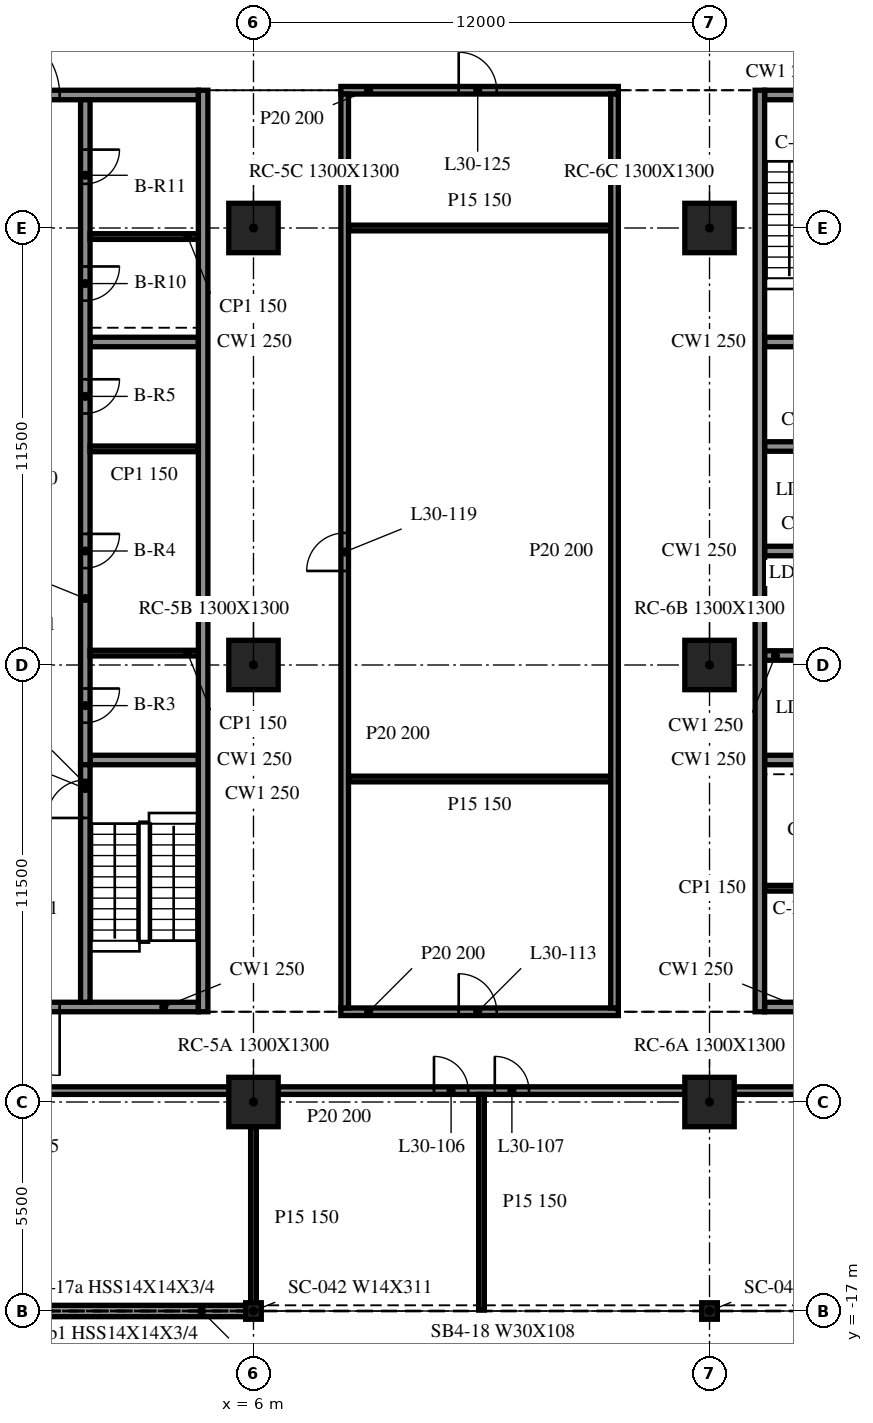
"""IFC4 building model, lengths in metres.
Left out: names, types, materials, properties, quantities, classifications, styles, units other than length and angle.
Written with IfcOpenShell. Run it as: python <this file> out.ifc"""

import sys

from ifc_helpers import new_model, si_unit, direction, frame, frame_2d, origin, origin_2d, place, context, subcontext, project, spatial, rectangle, i_section, extrude, element, fill, save


model = new_model("IFC4")
c1 = context("Model", 3, precision=1e-05, world=origin(), true_north=direction((0.0, 1.0)))
c2 = subcontext(c1, "Body", "Model", "MODEL_VIEW")
j1 = project(units=[si_unit("LENGTHUNIT", "METRE"), si_unit("PLANEANGLEUNIT", "RADIAN")], contexts=[c1])
p1 = place(None, origin())
s1 = spatial("IfcSite", under=j1, at=p1, CompositionType="ELEMENT")
p2 = place(p1, origin())
s2 = spatial("IfcBuilding", under=s1, at=p2, CompositionType="ELEMENT")
p3 = place(p2, frame((0.0, 0.0, 130.2)))
s3 = spatial("IfcBuildingStorey", under=s2, at=p3, CompositionType="ELEMENT", Elevation=130.2)
for number, where, z_axis, x_axis in (
    (1, (6.0, -11.5, -0.34), (0.0, 0.0, 1.0), (1.0, 0.0, 0.0)),
    (2, (6.0, 0.0, -0.34), (0.0, 0.0, 1.0), (1.0, 0.0, 0.0)),
    (3, (6.0, 11.5, -0.34), (0.0, 0.0, 1.0), (1.0, 0.0, 0.0)),
    (4, (18.0, -11.5, -0.34), (0.0, 0.0, 1.0), (1.0, 0.0, 0.0)),
    (5, (18.0, 0.0, -0.34), (0.0, 0.0, 1.0), (1.0, 0.0, 0.0)),
    (6, (18.0, 11.5, -0.34), (0.0, 0.0, 1.0), (1.0, 0.0, 0.0)),
):
    element("IfcColumn", number, at=place(p3, frame(where, z_axis=z_axis, x_axis=x_axis)), inside=s3, PredefinedType="COLUMN", context=c2, shape_type="SweptSolid", body=[
        extrude(rectangle(XDim=1.3, YDim=1.3, at=origin_2d()), origin(), (0.0, 0.0, 1.0), 4.1),
    ])
for number, where, z_axis, x_axis in (
    (7, (6.0, -17.0, -0.34), (0.0, 0.0, 1.0), (1.0, 0.0, 0.0)),
    (8, (18.0, -17.0, -0.34), (0.0, 0.0, 1.0), (1.0, 0.0, 0.0)),
):
    element("IfcColumn", number, at=place(p3, frame(where, z_axis=z_axis, x_axis=x_axis)), inside=s3, PredefinedType="COLUMN", context=c2, shape_type="SweptSolid", body=[
        extrude(i_section(OverallWidth=0.412, OverallDepth=0.434, WebThickness=0.036, FlangeThickness=0.057, at=origin_2d()), origin(), (0.0, 0.0, 1.0), 4.1),
    ])
p4 = place(p3, frame((-5.982, -17.0, 0.0), z_axis=(0.0, 0.0, 1.0), x_axis=(1.0, 0.0, 0.0)))
e9 = element("IfcWall", 9, at=p4, inside=s3, PredefinedType="NOTDEFINED", context=c2, shape_type="SweptSolid", body=[
    extrude(rectangle(XDim=11.964, YDim=0.3, at=frame_2d((5.982, 0.0))), origin(), (0.0, 0.0, 1.0), 3.003),
])
p5 = place(p3, frame((4.675, -9.125, 0.0), z_axis=(0.0, 0.0, 1.0), x_axis=(0.0, 1.0, 0.0)))
e10 = element("IfcWall", 10, at=p5, inside=s3, PredefinedType="SOLIDWALL", context=c2, shape_type="SweptSolid", body=[
    extrude(rectangle(XDim=24.25, YDim=0.25, at=frame_2d((12.125, 0.0))), origin(), (0.0, 0.0, 1.0), 3.76),
])
p6 = place(p3, frame((4.55, -9.0, 0.0), z_axis=(0.0, 0.0, 1.0), x_axis=(-1.0, 0.0, 0.0)))
e11 = element("IfcWall", 11, at=p6, inside=s3, PredefinedType="SOLIDWALL", context=c2, shape_type="SweptSolid", body=[
    extrude(rectangle(XDim=9.1, YDim=0.25, at=frame_2d((4.55, 0.0))), origin(), (0.0, 0.0, 1.0), 3.76),
])
p7 = place(p6, frame((3.65, 0.0, 0.0)))
e12 = element("IfcOpeningElement", 12, at=p7, cuts=e11, PredefinedType="OPENING", context=c2, shape_type="SweptSolid", body=[
    extrude(rectangle(XDim=1.8, YDim=2.1, at=frame_2d((0.9, 1.05))), frame((0.0, 0.135, 0.0), z_axis=(0.0, -1.0, 0.0), x_axis=(1.0, 0.0, 0.0)), (0.0, 0.0, 1.0), 0.27),
])
p8 = place(p3, frame((-4.55, 15.0, 0.0), z_axis=(0.0, 0.0, 1.0), x_axis=(1.0, 0.0, 0.0)))
e13 = element("IfcWall", 13, at=p8, inside=s3, PredefinedType="SOLIDWALL", context=c2, shape_type="SweptSolid", body=[
    extrude(rectangle(XDim=9.1, YDim=0.25, at=frame_2d((4.55, 0.0))), origin(), (0.0, 0.0, 1.0), 3.76),
])
p9 = place(p8, frame((3.65, 0.0, 0.0)))
e14 = element("IfcOpeningElement", 14, at=p9, cuts=e13, PredefinedType="OPENING", context=c2, shape_type="SweptSolid", body=[
    extrude(rectangle(XDim=1.8, YDim=2.1, at=frame_2d((0.9, 1.05))), frame((0.0, 0.135, 0.0), z_axis=(0.0, -1.0, 0.0), x_axis=(1.0, 0.0, 0.0)), (0.0, 0.0, 1.0), 0.27),
])
p10 = place(p3, frame((1.575, -8.875, 0.0), z_axis=(0.0, 0.0, 1.0), x_axis=(0.0, 1.0, 0.0)))
e15 = element("IfcWall", 15, at=p10, inside=s3, PredefinedType="SOLIDWALL", context=c2, shape_type="SweptSolid", body=[
    extrude(rectangle(XDim=6.25, YDim=0.25, at=frame_2d((3.125, 0.0))), origin(), (0.0, 0.0, 1.0), 3.76),
])
p11 = place(p10, frame((4.85, 0.0, 0.0)))
e16 = element("IfcOpeningElement", 16, at=p11, cuts=e15, PredefinedType="OPENING", context=c2, shape_type="SweptSolid", body=[
    extrude(rectangle(XDim=1.0, YDim=2.1, at=frame_2d((0.5, 1.05))), frame((0.0, 0.135, 0.0), z_axis=(0.0, -1.0, 0.0), x_axis=(1.0, 0.0, 0.0)), (0.0, 0.0, 1.0), 0.27),
])
p12 = place(p3, frame((1.575, 14.875, 0.0), z_axis=(0.0, 0.0, 1.0), x_axis=(0.0, -1.0, 0.0)))
e17 = element("IfcWall", 17, at=p12, inside=s3, PredefinedType="SOLIDWALL", context=c2, shape_type="SweptSolid", body=[
    extrude(rectangle(XDim=17.5, YDim=0.25, at=frame_2d((8.75, 0.0))), origin(), (0.0, 0.0, 1.0), 3.76),
])
p13 = place(p12, frame((15.494, 0.0, 0.0)))
e18 = element("IfcOpeningElement", 18, at=p13, cuts=e17, PredefinedType="OPENING", context=c2, shape_type="SweptSolid", body=[
    extrude(rectangle(XDim=0.9, YDim=2.1, at=frame_2d((0.45, 1.05))), frame((0.0, 0.135, 0.0), z_axis=(0.0, -1.0, 0.0), x_axis=(1.0, 0.0, 0.0)), (0.0, 0.0, 1.0), 0.27),
])
p14 = place(p12, frame((11.425, 0.0, 0.0)))
e19 = element("IfcOpeningElement", 19, at=p14, cuts=e17, PredefinedType="OPENING", context=c2, shape_type="SweptSolid", body=[
    extrude(rectangle(XDim=0.9, YDim=2.1, at=frame_2d((0.45, 1.05))), frame((0.0, 0.135, 0.0), z_axis=(0.0, -1.0, 0.0), x_axis=(1.0, 0.0, 0.0)), (0.0, 0.0, 1.0), 0.27),
])
p15 = place(p12, frame((7.356, 0.0, 0.0)))
e20 = element("IfcOpeningElement", 20, at=p15, cuts=e17, PredefinedType="OPENING", context=c2, shape_type="SweptSolid", body=[
    extrude(rectangle(XDim=0.9, YDim=2.1, at=frame_2d((0.45, 1.05))), frame((0.0, 0.135, 0.0), z_axis=(0.0, -1.0, 0.0), x_axis=(1.0, 0.0, 0.0)), (0.0, 0.0, 1.0), 0.27),
])
p16 = place(p12, frame((4.387, 0.0, 0.0)))
e21 = element("IfcOpeningElement", 21, at=p16, cuts=e17, PredefinedType="OPENING", context=c2, shape_type="SweptSolid", body=[
    extrude(rectangle(XDim=0.9, YDim=2.1, at=frame_2d((0.45, 1.05))), frame((0.0, 0.135, 0.0), z_axis=(0.0, -1.0, 0.0), x_axis=(1.0, 0.0, 0.0)), (0.0, 0.0, 1.0), 0.27),
])
p17 = place(p12, frame((1.312, 0.0, 0.0)))
e22 = element("IfcOpeningElement", 22, at=p17, cuts=e17, PredefinedType="OPENING", context=c2, shape_type="SweptSolid", body=[
    extrude(rectangle(XDim=0.9, YDim=2.1, at=frame_2d((0.45, 1.05))), frame((0.0, 0.135, 0.0), z_axis=(0.0, -1.0, 0.0), x_axis=(1.0, 0.0, 0.0)), (0.0, 0.0, 1.0), 0.27),
])
for number, where, z_axis, x_axis in (
    (23, (1.7, -2.5, 0.0), (0.0, 0.0, 1.0), (1.0, 0.0, 0.0)),
    (24, (1.7, 8.5, 0.0), (0.0, 0.0, 1.0), (1.0, 0.0, 0.0)),
):
    element("IfcWall", number, at=place(p3, frame(where, z_axis=z_axis, x_axis=x_axis)), inside=s3, PredefinedType="SOLIDWALL", context=c2, shape_type="SweptSolid", body=[
        extrude(rectangle(XDim=2.85, YDim=0.25, at=frame_2d((1.425, 0.0))), origin(), (0.0, 0.0, 1.0), 3.76),
    ])
for number, where, z_axis, x_axis in (
    (25, (1.7, 0.312, 0.0), (0.0, 0.0, 1.0), (1.0, 0.0, 0.0)),
    (26, (1.7, 5.688, 0.0), (0.0, 0.0, 1.0), (1.0, 0.0, 0.0)),
    (27, (1.7, 11.275, 0.0), (0.0, 0.0, 1.0), (1.0, 0.0, 0.0)),
):
    element("IfcWall", number, at=place(p3, frame(where, z_axis=z_axis, x_axis=x_axis)), inside=s3, PredefinedType="PARTITIONING", context=c2, shape_type="SweptSolid", body=[
        extrude(rectangle(XDim=2.85, YDim=0.15, at=frame_2d((1.425, 0.0))), origin(), (0.0, 0.0, 1.0), 3.76),
    ])
p18 = place(p3, frame((19.325, 15.125, 0.0), z_axis=(0.0, 0.0, 1.0), x_axis=(0.0, -1.0, 0.0)))
e28 = element("IfcWall", 28, at=p18, inside=s3, PredefinedType="SOLIDWALL", context=c2, shape_type="SweptSolid", body=[
    extrude(rectangle(XDim=24.25, YDim=0.25, at=frame_2d((12.125, 0.0))), origin(), (0.0, 0.0, 1.0), 3.76),
])
p19 = place(p3, frame((28.55, -9.0, 0.0), z_axis=(0.0, 0.0, 1.0), x_axis=(-1.0, 0.0, 0.0)))
e29 = element("IfcWall", 29, at=p19, inside=s3, PredefinedType="SOLIDWALL", context=c2, shape_type="SweptSolid", body=[
    extrude(rectangle(XDim=9.1, YDim=0.25, at=frame_2d((4.55, 0.0))), origin(), (0.0, 0.0, 1.0), 3.76),
])
p20 = place(p19, frame((3.65, 0.0, 0.0)))
e30 = element("IfcOpeningElement", 30, at=p20, cuts=e29, PredefinedType="OPENING", context=c2, shape_type="SweptSolid", body=[
    extrude(rectangle(XDim=1.8, YDim=2.1, at=frame_2d((0.9, 1.05))), frame((0.0, 0.135, 0.0), z_axis=(0.0, -1.0, 0.0), x_axis=(1.0, 0.0, 0.0)), (0.0, 0.0, 1.0), 0.27),
])
p21 = place(p3, frame((19.45, 15.0, 0.0), z_axis=(0.0, 0.0, 1.0), x_axis=(1.0, 0.0, 0.0)))
e31 = element("IfcWall", 31, at=p21, inside=s3, PredefinedType="SOLIDWALL", context=c2, shape_type="SweptSolid", body=[
    extrude(rectangle(XDim=9.1, YDim=0.25, at=frame_2d((4.55, 0.0))), origin(), (0.0, 0.0, 1.0), 3.76),
])
p22 = place(p21, frame((3.65, 0.0, 0.0)))
e32 = element("IfcOpeningElement", 32, at=p22, cuts=e31, PredefinedType="OPENING", context=c2, shape_type="SweptSolid", body=[
    extrude(rectangle(XDim=1.8, YDim=2.1, at=frame_2d((0.9, 1.05))), frame((0.0, 0.135, 0.0), z_axis=(0.0, -1.0, 0.0), x_axis=(1.0, 0.0, 0.0)), (0.0, 0.0, 1.0), 0.27),
])
for number, where, z_axis, x_axis in (
    (33, (19.45, -2.5, 0.0), (0.0, 0.0, 1.0), (1.0, 0.0, 0.0)),
    (34, (19.45, 0.25, 0.0), (0.0, 0.0, 1.0), (1.0, 0.0, 0.0)),
    (35, (19.45, 3.0, 0.0), (0.0, 0.0, 1.0), (1.0, 0.0, 0.0)),
    (36, (19.45, 5.75, 0.0), (0.0, 0.0, 1.0), (1.0, 0.0, 0.0)),
    (37, (19.45, 8.5, 0.0), (0.0, 0.0, 1.0), (1.0, 0.0, 0.0)),
):
    element("IfcWall", number, at=place(p3, frame(where, z_axis=z_axis, x_axis=x_axis)), inside=s3, PredefinedType="SOLIDWALL", context=c2, shape_type="SweptSolid", body=[
        extrude(rectangle(XDim=2.85, YDim=0.25, at=frame_2d((1.425, 0.0))), origin(), (0.0, 0.0, 1.0), 3.76),
    ])
p23 = place(p3, frame((19.45, -5.875, 0.0), z_axis=(0.0, 0.0, 1.0), x_axis=(1.0, 0.0, 0.0)))
e38 = element("IfcWall", 38, at=p23, inside=s3, PredefinedType="PARTITIONING", context=c2, shape_type="SweptSolid", body=[
    extrude(rectangle(XDim=2.85, YDim=0.15, at=frame_2d((1.425, 0.0))), origin(), (0.0, 0.0, 1.0), 3.76),
])
p24 = place(p3, frame((-5.35, -11.2, 0.0), z_axis=(0.0, 0.0, 1.0), x_axis=(1.0, 0.0, 0.0)))
e39 = element("IfcWall", 39, at=p24, inside=s3, PredefinedType="PARTITIONING", context=c2, shape_type="SweptSolid", body=[
    extrude(rectangle(XDim=10.7, YDim=0.2, at=frame_2d((5.35, 0.0))), origin(), (0.0, 0.0, 1.0), 3.76),
])
p25 = place(p24, frame((4.9, 0.0, 0.0)))
e40 = element("IfcOpeningElement", 40, at=p25, cuts=e39, PredefinedType="OPENING", context=c2, shape_type="SweptSolid", body=[
    extrude(rectangle(XDim=0.9, YDim=2.1, at=frame_2d((0.45, 1.05))), frame((0.0, 0.11, 0.0), z_axis=(0.0, -1.0, 0.0), x_axis=(1.0, 0.0, 0.0)), (0.0, 0.0, 1.0), 0.22),
])
p26 = place(p3, frame((6.65, -11.2, 0.0), z_axis=(0.0, 0.0, 1.0), x_axis=(1.0, 0.0, 0.0)))
e41 = element("IfcWall", 41, at=p26, inside=s3, PredefinedType="PARTITIONING", context=c2, shape_type="SweptSolid", body=[
    extrude(rectangle(XDim=10.7, YDim=0.2, at=frame_2d((5.35, 0.0))), origin(), (0.0, 0.0, 1.0), 3.76),
])
p27 = place(p26, frame((4.1, 0.0, 0.0)))
e42 = element("IfcOpeningElement", 42, at=p27, cuts=e41, PredefinedType="OPENING", context=c2, shape_type="SweptSolid", body=[
    extrude(rectangle(XDim=0.9, YDim=2.1, at=frame_2d((0.45, 1.05))), frame((0.0, 0.11, 0.0), z_axis=(0.0, -1.0, 0.0), x_axis=(1.0, 0.0, 0.0)), (0.0, 0.0, 1.0), 0.22),
])
p28 = place(p26, frame((5.7, 0.0, 0.0)))
e43 = element("IfcOpeningElement", 43, at=p28, cuts=e41, PredefinedType="OPENING", context=c2, shape_type="SweptSolid", body=[
    extrude(rectangle(XDim=0.9, YDim=2.1, at=frame_2d((0.45, 1.05))), frame((0.0, 0.11, 0.0), z_axis=(0.0, -1.0, 0.0), x_axis=(1.0, 0.0, 0.0)), (0.0, 0.0, 1.0), 0.22),
])
p29 = place(p3, frame((18.65, -11.2, 0.0), z_axis=(0.0, 0.0, 1.0), x_axis=(1.0, 0.0, 0.0)))
e44 = element("IfcWall", 44, at=p29, inside=s3, PredefinedType="PARTITIONING", context=c2, shape_type="SweptSolid", body=[
    extrude(rectangle(XDim=10.7, YDim=0.2, at=frame_2d((5.35, 0.0))), origin(), (0.0, 0.0, 1.0), 3.76),
])
p30 = place(p29, frame((5.7, 0.0, 0.0)))
e45 = element("IfcOpeningElement", 45, at=p30, cuts=e44, PredefinedType="OPENING", context=c2, shape_type="SweptSolid", body=[
    extrude(rectangle(XDim=0.9, YDim=2.1, at=frame_2d((0.45, 1.05))), frame((0.0, 0.11, 0.0), z_axis=(0.0, -1.0, 0.0), x_axis=(1.0, 0.0, 0.0)), (0.0, 0.0, 1.0), 0.22),
])
p31 = place(p3, frame((8.3, -9.125, 0.0), z_axis=(0.0, 0.0, 1.0), x_axis=(1.0, 0.0, 0.0)))
e46 = element("IfcWall", 46, at=p31, inside=s3, PredefinedType="PARTITIONING", context=c2, shape_type="SweptSolid", body=[
    extrude(rectangle(XDim=7.3, YDim=0.2, at=frame_2d((3.65, 0.0))), origin(), (0.0, 0.0, 1.0), 3.76),
])
p32 = place(p31, frame((3.1, 0.0, 0.0)))
e47 = element("IfcOpeningElement", 47, at=p32, cuts=e46, PredefinedType="OPENING", context=c2, shape_type="SweptSolid", body=[
    extrude(rectangle(XDim=1.0, YDim=2.1, at=frame_2d((0.5, 1.05))), frame((0.0, 0.11, 0.0), z_axis=(0.0, -1.0, 0.0), x_axis=(1.0, 0.0, 0.0)), (0.0, 0.0, 1.0), 0.22),
])
for number, where, z_axis, x_axis in (
    (48, (8.5, -3.0, 0.0), (0.0, 0.0, 1.0), (1.0, 0.0, 0.0)),
    (49, (8.5, 11.5, 0.0), (0.0, 0.0, 1.0), (1.0, 0.0, 0.0)),
):
    element("IfcWall", number, at=place(p3, frame(where, z_axis=z_axis, x_axis=x_axis)), inside=s3, PredefinedType="PARTITIONING", context=c2, shape_type="SweptSolid", body=[
        extrude(rectangle(XDim=6.9, YDim=0.15, at=frame_2d((3.45, 0.0))), origin(), (0.0, 0.0, 1.0), 3.76),
    ])
p33 = place(p3, frame((8.3, 15.125, 0.0), z_axis=(0.0, 0.0, 1.0), x_axis=(1.0, 0.0, 0.0)))
e50 = element("IfcWall", 50, at=p33, inside=s3, PredefinedType="PARTITIONING", context=c2, shape_type="SweptSolid", body=[
    extrude(rectangle(XDim=7.3, YDim=0.2, at=frame_2d((3.65, 0.0))), origin(), (0.0, 0.0, 1.0), 3.76),
])
p34 = place(p33, frame((3.1, 0.0, 0.0)))
e51 = element("IfcOpeningElement", 51, at=p34, cuts=e50, PredefinedType="OPENING", context=c2, shape_type="SweptSolid", body=[
    extrude(rectangle(XDim=1.0, YDim=2.1, at=frame_2d((0.5, 1.05))), frame((0.0, 0.11, 0.0), z_axis=(0.0, -1.0, 0.0), x_axis=(1.0, 0.0, 0.0)), (0.0, 0.0, 1.0), 0.22),
])
p35 = place(p3, frame((6.0, -16.975, 0.0), z_axis=(0.0, 0.0, 1.0), x_axis=(0.0, 1.0, 0.0)))
e52 = element("IfcWall", 52, at=p35, inside=s3, PredefinedType="PARTITIONING", context=c2, shape_type="SweptSolid", body=[
    extrude(rectangle(XDim=4.825, YDim=0.15, at=frame_2d((2.413, 0.0))), origin(), (0.0, 0.0, 1.0), 3.76),
])
p36 = place(p3, frame((8.4, -9.025, 0.0), z_axis=(0.0, 0.0, 1.0), x_axis=(0.0, 1.0, 0.0)))
e53 = element("IfcWall", 53, at=p36, inside=s3, PredefinedType="PARTITIONING", context=c2, shape_type="SweptSolid", body=[
    extrude(rectangle(XDim=24.05, YDim=0.2, at=frame_2d((12.025, 0.0))), origin(), (0.0, 0.0, 1.0), 3.76),
])
p37 = place(p36, frame((11.5, 0.0, 0.0)))
e54 = element("IfcOpeningElement", 54, at=p37, cuts=e53, PredefinedType="OPENING", context=c2, shape_type="SweptSolid", body=[
    extrude(rectangle(XDim=1.0, YDim=2.1, at=frame_2d((0.5, 1.05))), frame((0.0, 0.11, 0.0), z_axis=(0.0, -1.0, 0.0), x_axis=(1.0, 0.0, 0.0)), (0.0, 0.0, 1.0), 0.22),
])
p38 = place(p3, frame((12.0, -16.975, 0.0), z_axis=(0.0, 0.0, 1.0), x_axis=(0.0, 1.0, 0.0)))
e55 = element("IfcWall", 55, at=p38, inside=s3, PredefinedType="PARTITIONING", context=c2, shape_type="SweptSolid", body=[
    extrude(rectangle(XDim=5.675, YDim=0.15, at=frame_2d((2.837, 0.0))), origin(), (0.0, 0.0, 1.0), 3.76),
])
p39 = place(p3, frame((15.5, -9.025, 0.0), z_axis=(0.0, 0.0, 1.0), x_axis=(0.0, 1.0, 0.0)))
e56 = element("IfcWall", 56, at=p39, inside=s3, PredefinedType="PARTITIONING", context=c2, shape_type="SweptSolid", body=[
    extrude(rectangle(XDim=24.05, YDim=0.2, at=frame_2d((12.025, 0.0))), origin(), (0.0, 0.0, 1.0), 3.76),
])
p40 = place(p7, origin())
e57 = element("IfcDoor", 57, at=p40, inside=s3, OperationType="DOUBLE_DOOR_SINGLE_SWING", PredefinedType="DOOR", context=c2, shape_type="SweptSolid", body=[
    extrude(rectangle(XDim=1.8, YDim=2.1, at=frame_2d((0.9, 1.05))), frame((0.0, 0.025, 0.0), z_axis=(0.0, -1.0, 0.0), x_axis=(1.0, 0.0, 0.0)), (0.0, 0.0, 1.0), 0.05),
])
fill(e12, e57)
p41 = place(p9, origin())
e58 = element("IfcDoor", 58, at=p41, inside=s3, OperationType="DOUBLE_DOOR_SINGLE_SWING", PredefinedType="DOOR", context=c2, shape_type="SweptSolid", body=[
    extrude(rectangle(XDim=1.8, YDim=2.1, at=frame_2d((0.9, 1.05))), frame((0.0, 0.025, 0.0), z_axis=(0.0, -1.0, 0.0), x_axis=(1.0, 0.0, 0.0)), (0.0, 0.0, 1.0), 0.05),
])
fill(e14, e58)
p42 = place(p13, origin())
e59 = element("IfcDoor", 59, at=p42, inside=s3, OperationType="SINGLE_SWING_LEFT", PredefinedType="DOOR", context=c2, shape_type="SweptSolid", body=[
    extrude(rectangle(XDim=0.9, YDim=2.1, at=frame_2d((0.45, 1.05))), frame((0.0, 0.025, 0.0), z_axis=(0.0, -1.0, 0.0), x_axis=(1.0, 0.0, 0.0)), (0.0, 0.0, 1.0), 0.05),
])
fill(e18, e59)
p43 = place(p14, origin())
e60 = element("IfcDoor", 60, at=p43, inside=s3, OperationType="SINGLE_SWING_RIGHT", PredefinedType="DOOR", context=c2, shape_type="SweptSolid", body=[
    extrude(rectangle(XDim=0.9, YDim=2.1, at=frame_2d((0.45, 1.05))), frame((0.0, 0.025, 0.0), z_axis=(0.0, -1.0, 0.0), x_axis=(1.0, 0.0, 0.0)), (0.0, 0.0, 1.0), 0.05),
])
fill(e19, e60)
p44 = place(p15, origin())
e61 = element("IfcDoor", 61, at=p44, inside=s3, OperationType="SINGLE_SWING_LEFT", PredefinedType="DOOR", context=c2, shape_type="SweptSolid", body=[
    extrude(rectangle(XDim=0.9, YDim=2.1, at=frame_2d((0.45, 1.05))), frame((0.0, 0.025, 0.0), z_axis=(0.0, -1.0, 0.0), x_axis=(1.0, 0.0, 0.0)), (0.0, 0.0, 1.0), 0.05),
])
fill(e20, e61)
p45 = place(p16, origin())
e62 = element("IfcDoor", 62, at=p45, inside=s3, OperationType="SINGLE_SWING_RIGHT", PredefinedType="DOOR", context=c2, shape_type="SweptSolid", body=[
    extrude(rectangle(XDim=0.9, YDim=2.1, at=frame_2d((0.45, 1.05))), frame((0.0, 0.025, 0.0), z_axis=(0.0, -1.0, 0.0), x_axis=(1.0, 0.0, 0.0)), (0.0, 0.0, 1.0), 0.05),
])
fill(e21, e62)
p46 = place(p17, origin())
e63 = element("IfcDoor", 63, at=p46, inside=s3, OperationType="SINGLE_SWING_LEFT", PredefinedType="DOOR", context=c2, shape_type="SweptSolid", body=[
    extrude(rectangle(XDim=0.9, YDim=2.1, at=frame_2d((0.45, 1.05))), frame((0.0, 0.025, 0.0), z_axis=(0.0, -1.0, 0.0), x_axis=(1.0, 0.0, 0.0)), (0.0, 0.0, 1.0), 0.05),
])
fill(e22, e63)
p47 = place(p11, origin())
e64 = element("IfcDoor", 64, at=p47, inside=s3, OperationType="SINGLE_SWING_RIGHT", PredefinedType="DOOR", context=c2, shape_type="SweptSolid", body=[
    extrude(rectangle(XDim=1.0, YDim=2.1, at=frame_2d((0.5, 1.05))), frame((0.0, 0.025, 0.0), z_axis=(0.0, -1.0, 0.0), x_axis=(1.0, 0.0, 0.0)), (0.0, 0.0, 1.0), 0.05),
])
fill(e16, e64)
p48 = place(p27, origin())
e65 = element("IfcDoor", 65, at=p48, inside=s3, OperationType="SINGLE_SWING_RIGHT", PredefinedType="DOOR", context=c2, shape_type="SweptSolid", body=[
    extrude(rectangle(XDim=0.9, YDim=2.1, at=frame_2d((0.45, 1.05))), frame((0.0, 0.025, 0.0), z_axis=(0.0, -1.0, 0.0), x_axis=(1.0, 0.0, 0.0)), (0.0, 0.0, 1.0), 0.05),
])
fill(e42, e65)
p49 = place(p28, origin())
e66 = element("IfcDoor", 66, at=p49, inside=s3, OperationType="SINGLE_SWING_LEFT", PredefinedType="DOOR", context=c2, shape_type="SweptSolid", body=[
    extrude(rectangle(XDim=0.9, YDim=2.1, at=frame_2d((0.45, 1.05))), frame((0.0, 0.025, 0.0), z_axis=(0.0, -1.0, 0.0), x_axis=(1.0, 0.0, 0.0)), (0.0, 0.0, 1.0), 0.05),
])
fill(e43, e66)
p50 = place(p32, origin())
e67 = element("IfcDoor", 67, at=p50, inside=s3, OperationType="SINGLE_SWING_LEFT", PredefinedType="DOOR", context=c2, shape_type="SweptSolid", body=[
    extrude(rectangle(XDim=1.0, YDim=2.1, at=frame_2d((0.5, 1.05))), frame((0.0, 0.025, 0.0), z_axis=(0.0, -1.0, 0.0), x_axis=(1.0, 0.0, 0.0)), (0.0, 0.0, 1.0), 0.05),
])
fill(e47, e67)
p51 = place(p37, origin())
e68 = element("IfcDoor", 68, at=p51, inside=s3, OperationType="SINGLE_SWING_RIGHT", PredefinedType="DOOR", context=c2, shape_type="SweptSolid", body=[
    extrude(rectangle(XDim=1.0, YDim=2.1, at=frame_2d((0.5, 1.05))), frame((0.0, 0.025, 0.0), z_axis=(0.0, -1.0, 0.0), x_axis=(1.0, 0.0, 0.0)), (0.0, 0.0, 1.0), 0.05),
])
fill(e54, e68)
p52 = place(p34, origin())
e69 = element("IfcDoor", 69, at=p52, inside=s3, OperationType="SINGLE_SWING_RIGHT", PredefinedType="DOOR", context=c2, shape_type="SweptSolid", body=[
    extrude(rectangle(XDim=1.0, YDim=2.1, at=frame_2d((0.5, 1.05))), frame((0.0, 0.025, 0.0), z_axis=(0.0, -1.0, 0.0), x_axis=(1.0, 0.0, 0.0)), (0.0, 0.0, 1.0), 0.05),
])
fill(e51, e69)
save(model, sys.argv[1])
